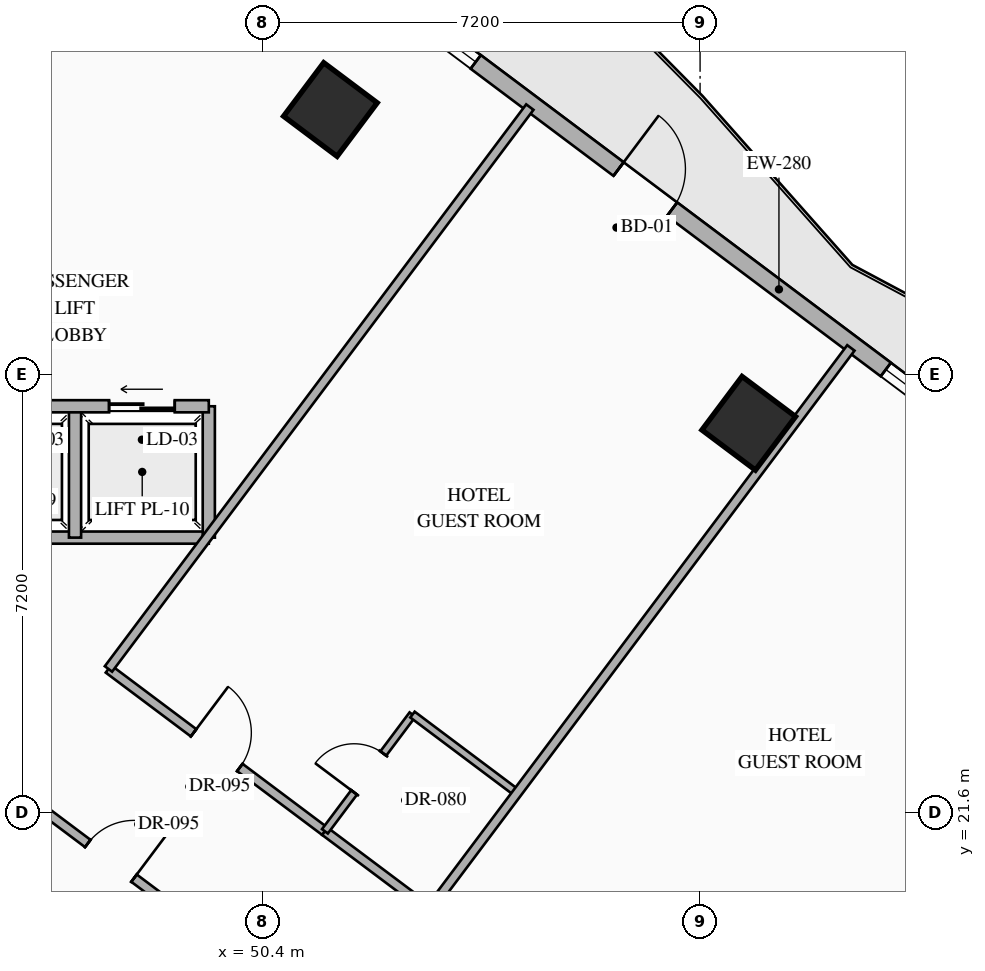
"""IFC4 building model, lengths in metres.
Left out: names, types, materials, properties, quantities, classifications, styles, units other than length and angle.
Written with IfcOpenShell. Run it as: python <this file> out.ifc"""

import sys

from ifc_helpers import new_model, si_unit, direction, frame, frame_2d, origin, origin_2d, place, context, subcontext, project, spatial, rectangle, hollow_rectangle, extrude, element, fill, save


model = new_model("IFC4")
c1 = context("Model", 3, precision=1e-05, world=origin(), true_north=direction((0.0, 1.0)))
c2 = subcontext(c1, "Body", "Model", "MODEL_VIEW")
j1 = project(units=[si_unit("LENGTHUNIT", "METRE"), si_unit("PLANEANGLEUNIT", "RADIAN")], contexts=[c1])
p1 = place(None, origin())
s1 = spatial("IfcSite", under=j1, at=p1, CompositionType="ELEMENT")
p2 = place(p1, origin())
s2 = spatial("IfcBuilding", under=s1, at=p2, CompositionType="ELEMENT")
p3 = place(p2, frame((0.0, 0.0, 66.75)))
s3 = spatial("IfcBuildingStorey", under=s2, at=p3, CompositionType="ELEMENT", Elevation=66.75)
for number, where, z_axis, x_axis in (
    (1, (51.52, 33.16, 0.0), (0.0, 0.0, 1.0), (0.8, -0.6, 0.0)),
    (2, (58.4, 28.0, 0.0), (0.0, 0.0, 1.0), (0.8, -0.6, 0.0)),
):
    element("IfcColumn", number, at=place(p3, frame(where, z_axis=z_axis, x_axis=x_axis)), inside=s3, PredefinedType="COLUMN", context=c2, shape_type="SweptSolid", body=[
        extrude(hollow_rectangle(XDim=1.1, YDim=1.1, WallThickness=0.04, at=origin_2d()), origin(), (0.0, 0.0, 1.0), 3.35),
    ])
p4 = place(p3, frame((44.86, 40.73, 0.0), z_axis=(0.0, 0.0, 1.0), x_axis=(0.800006902154, -0.599990797017, 0.0)))
e3 = element("IfcWall", 3, at=p4, inside=s3, PredefinedType="STANDARD", context=c2, shape_type="SweptSolid", body=[
    extrude(rectangle(XDim=29.712, YDim=0.28, at=frame_2d((14.856, 0.0))), origin(), (0.0, 0.0, 1.0), 3.09),
])
p5 = place(p4, frame((14.249, 0.0, 0.0)))
e4 = element("IfcOpeningElement", 4, at=p5, cuts=e3, PredefinedType="OPENING", context=c2, shape_type="SweptSolid", body=[
    extrude(rectangle(XDim=1.1, YDim=2.2, at=frame_2d((0.55, 1.1))), frame((0.0, 0.15, 0.0), z_axis=(0.0, -1.0, 0.0), x_axis=(1.0, 0.0, 0.0)), (0.0, 0.0, 1.0), 0.3),
])
p6 = place(p4, frame((1.612, 0.0, 0.85)))
e5 = element("IfcOpeningElement", 5, at=p6, cuts=e3, PredefinedType="OPENING", context=c2, shape_type="SweptSolid", body=[
    extrude(rectangle(XDim=1.4, YDim=1.8, at=frame_2d((0.7, 0.9))), frame((0.0, 0.15, 0.0), z_axis=(0.0, -1.0, 0.0), x_axis=(1.0, 0.0, 0.0)), (0.0, 0.0, 1.0), 0.3),
])
p7 = place(p4, frame((5.667, 0.0, 0.85)))
e6 = element("IfcOpeningElement", 6, at=p7, cuts=e3, PredefinedType="OPENING", context=c2, shape_type="SweptSolid", body=[
    extrude(rectangle(XDim=1.4, YDim=1.8, at=frame_2d((0.7, 0.9))), frame((0.0, 0.15, 0.0), z_axis=(0.0, -1.0, 0.0), x_axis=(1.0, 0.0, 0.0)), (0.0, 0.0, 1.0), 0.3),
])
p8 = place(p4, frame((9.912, 0.0, 0.85)))
e7 = element("IfcOpeningElement", 7, at=p8, cuts=e3, PredefinedType="OPENING", context=c2, shape_type="SweptSolid", body=[
    extrude(rectangle(XDim=1.4, YDim=1.8, at=frame_2d((0.7, 0.9))), frame((0.0, 0.15, 0.0), z_axis=(0.0, -1.0, 0.0), x_axis=(1.0, 0.0, 0.0)), (0.0, 0.0, 1.0), 0.3),
])
p9 = place(p4, frame((19.743, 0.0, 0.85)))
e8 = element("IfcOpeningElement", 8, at=p9, cuts=e3, PredefinedType="OPENING", context=c2, shape_type="SweptSolid", body=[
    extrude(rectangle(XDim=1.4, YDim=1.8, at=frame_2d((0.7, 0.9))), frame((0.0, 0.15, 0.0), z_axis=(0.0, -1.0, 0.0), x_axis=(1.0, 0.0, 0.0)), (0.0, 0.0, 1.0), 0.3),
])
p10 = place(p4, frame((22.645, 0.0, 0.85)))
e9 = element("IfcOpeningElement", 9, at=p10, cuts=e3, PredefinedType="OPENING", context=c2, shape_type="SweptSolid", body=[
    extrude(rectangle(XDim=1.4, YDim=1.8, at=frame_2d((0.7, 0.9))), frame((0.0, 0.15, 0.0), z_axis=(0.0, -1.0, 0.0), x_axis=(1.0, 0.0, 0.0)), (0.0, 0.0, 1.0), 0.3),
])
p11 = place(p4, frame((26.7, 0.0, 0.85)))
e10 = element("IfcOpeningElement", 10, at=p11, cuts=e3, PredefinedType="OPENING", context=c2, shape_type="SweptSolid", body=[
    extrude(rectangle(XDim=1.4, YDim=1.8, at=frame_2d((0.7, 0.9))), frame((0.0, 0.15, 0.0), z_axis=(0.0, -1.0, 0.0), x_axis=(1.0, 0.0, 0.0)), (0.0, 0.0, 1.0), 0.3),
])
p12 = place(p3, frame((45.12, 26.12, 0.0), z_axis=(0.0, 0.0, 1.0), x_axis=(1.0, 0.0, 0.0)))
e11 = element("IfcWall", 11, at=p12, inside=s3, PredefinedType="STANDARD", context=c2, shape_type="SweptSolid", body=[
    extrude(rectangle(XDim=4.4, YDim=0.2, at=frame_2d((2.2, 0.0))), origin(), (0.0, 0.0, 1.0), 3.09),
])
for number, where, z_axis, x_axis in (
    (12, (49.52, 26.12, 0.0), (0.0, 0.0, 1.0), (0.0, 1.0, 0.0)),
    (13, (47.32, 26.12, 0.0), (0.0, 0.0, 1.0), (0.0, 1.0, 0.0)),
):
    element("IfcWall", number, at=place(p3, frame(where, z_axis=z_axis, x_axis=x_axis)), inside=s3, PredefinedType="STANDARD", context=c2, shape_type="SweptSolid", body=[
        extrude(rectangle(XDim=2.16, YDim=0.2, at=frame_2d((1.08, 0.0))), origin(), (0.0, 0.0, 1.0), 3.09),
    ])
p13 = place(p3, frame((45.12, 28.28, 0.0), z_axis=(0.0, 0.0, 1.0), x_axis=(1.0, 0.0, 0.0)))
e14 = element("IfcWall", 14, at=p13, inside=s3, PredefinedType="STANDARD", context=c2, shape_type="SweptSolid", body=[
    extrude(rectangle(XDim=4.4, YDim=0.2, at=frame_2d((2.2, 0.0))), origin(), (0.0, 0.0, 1.0), 3.09),
])
p14 = place(p13, frame((0.56, 0.0, 0.0)))
e15 = element("IfcOpeningElement", 15, at=p14, cuts=e14, PredefinedType="OPENING", context=c2, shape_type="SweptSolid", body=[
    extrude(rectangle(XDim=1.08, YDim=2.15, at=frame_2d((0.54, 1.075))), frame((0.0, 0.11, 0.0), z_axis=(0.0, -1.0, 0.0), x_axis=(1.0, 0.0, 0.0)), (0.0, 0.0, 1.0), 0.22),
])
p15 = place(p13, frame((2.76, 0.0, 0.0)))
e16 = element("IfcOpeningElement", 16, at=p15, cuts=e14, PredefinedType="OPENING", context=c2, shape_type="SweptSolid", body=[
    extrude(rectangle(XDim=1.08, YDim=2.15, at=frame_2d((0.54, 1.075))), frame((0.0, 0.11, 0.0), z_axis=(0.0, -1.0, 0.0), x_axis=(1.0, 0.0, 0.0)), (0.0, 0.0, 1.0), 0.22),
])
p16 = place(p3, frame((47.87, 23.96, 0.0), z_axis=(0.0, 0.0, 1.0), x_axis=(0.799993416095, -0.600008778439, 0.0)))
e17 = element("IfcWall", 17, at=p16, inside=s3, PredefinedType="PARTITIONING", context=c2, shape_type="SweptSolid", body=[
    extrude(rectangle(XDim=4.45, YDim=0.15, at=frame_2d((2.225, 0.0))), origin(), (0.0, 0.0, 1.0), 2.775),
])
p17 = place(p16, frame((1.75, 0.0, 0.0)))
e18 = element("IfcOpeningElement", 18, at=p17, cuts=e17, PredefinedType="OPENING", context=c2, shape_type="SweptSolid", body=[
    extrude(rectangle(XDim=0.95, YDim=2.15, at=frame_2d((0.475, 1.075))), frame((0.0, 0.085, 0.0), z_axis=(0.0, -1.0, 0.0), x_axis=(1.0, 0.0, 0.0)), (0.0, 0.0, 1.0), 0.17),
])
p18 = place(p3, frame((51.43, 21.29, 0.0), z_axis=(0.0, 0.0, 1.0), x_axis=(0.79998637334, -0.60001816845, 0.0)))
e19 = element("IfcWall", 19, at=p18, inside=s3, PredefinedType="PARTITIONING", context=c2, shape_type="SweptSolid", body=[
    extrude(rectangle(XDim=2.15, YDim=0.15, at=frame_2d((1.075, 0.0))), origin(), (0.0, 0.0, 1.0), 2.775),
])
p19 = place(p3, frame((51.43, 21.29, 0.0), z_axis=(0.0, 0.0, 1.0), x_axis=(0.600065100855, 0.79995117022, 0.0)))
e20 = element("IfcWall", 20, at=p19, inside=s3, PredefinedType="PARTITIONING", context=c2, shape_type="SweptSolid", body=[
    extrude(rectangle(XDim=2.4, YDim=0.12, at=frame_2d((1.2, 0.0))), origin(), (0.0, 0.0, 1.0), 3.09),
])
p20 = place(p19, frame((0.8, 0.0, 0.0)))
e21 = element("IfcOpeningElement", 21, at=p20, cuts=e20, PredefinedType="OPENING", context=c2, shape_type="SweptSolid", body=[
    extrude(rectangle(XDim=0.8, YDim=2.06, at=frame_2d((0.4, 1.03))), frame((0.0, 0.07, 0.0), z_axis=(0.0, -1.0, 0.0), x_axis=(1.0, 0.0, 0.0)), (0.0, 0.0, 1.0), 0.14),
])
p21 = place(p3, frame((52.87, 23.21, 0.0), z_axis=(0.0, 0.0, 1.0), x_axis=(0.79998637334, -0.60001816845, 0.0)))
e22 = element("IfcWall", 22, at=p21, inside=s3, PredefinedType="PARTITIONING", context=c2, shape_type="SweptSolid", body=[
    extrude(rectangle(XDim=2.15, YDim=0.12, at=frame_2d((1.075, 0.0))), origin(), (0.0, 0.0, 1.0), 3.09),
])
for number, where, z_axis, x_axis in (
    (23, (47.87, 23.96, 0.0), (0.0, 0.0, 1.0), (0.6, 0.8, 0.0)),
    (24, (53.15, 20.0, 0.0), (0.0, 0.0, 1.0), (0.6, 0.8, 0.0)),
    (25, (58.43, 16.04, 0.0), (0.0, 0.0, 1.0), (0.6, 0.8, 0.0)),
):
    element("IfcWall", number, at=place(p3, frame(where, z_axis=z_axis, x_axis=x_axis)), inside=s3, PredefinedType="PARTITIONING", context=c2, shape_type="SweptSolid", body=[
        extrude(rectangle(XDim=11.55, YDim=0.15, at=frame_2d((5.775, 0.0))), origin(), (0.0, 0.0, 1.0), 3.09),
    ])
p22 = place(p3, frame((46.37, 21.96, 0.0), z_axis=(0.0, 0.0, 1.0), x_axis=(0.799977170108, -0.600030438649, 0.0)))
e26 = element("IfcWall", 26, at=p22, inside=s3, PredefinedType="PARTITIONING", context=c2, shape_type="SweptSolid", body=[
    extrude(rectangle(XDim=3.85, YDim=0.15, at=frame_2d((1.925, 0.0))), origin(), (0.0, 0.0, 1.0), 2.425),
])
p23 = place(p22, frame((1.45, 0.0, 0.0)))
e27 = element("IfcOpeningElement", 27, at=p23, cuts=e26, PredefinedType="OPENING", context=c2, shape_type="SweptSolid", body=[
    extrude(rectangle(XDim=0.95, YDim=2.15, at=frame_2d((0.475, 1.075))), frame((0.0, 0.085, 0.0), z_axis=(0.0, -1.0, 0.0), x_axis=(1.0, 0.0, 0.0)), (0.0, 0.0, 1.0), 0.17),
])
p24 = place(p5, origin())
e28 = element("IfcDoor", 28, at=p24, inside=s3, OperationType="SINGLE_SWING_LEFT", PredefinedType="DOOR", context=c2, shape_type="SweptSolid", body=[
    extrude(rectangle(XDim=1.1, YDim=2.2, at=frame_2d((0.55, 1.1))), frame((0.0, 0.025, 0.0), z_axis=(0.0, -1.0, 0.0), x_axis=(1.0, 0.0, 0.0)), (0.0, 0.0, 1.0), 0.05),
])
fill(e4, e28)
p25 = place(p8, origin())
e29 = element("IfcWindow", 29, at=p25, inside=s3, PartitioningType="SINGLE_PANEL", PredefinedType="WINDOW", context=c2, shape_type="SweptSolid", body=[
    extrude(rectangle(XDim=1.4, YDim=1.8, at=frame_2d((0.7, 0.9))), frame((0.0, 0.03, 0.0), z_axis=(0.0, -1.0, 0.0), x_axis=(1.0, 0.0, 0.0)), (0.0, 0.0, 1.0), 0.06),
])
fill(e7, e29)
p26 = place(p9, origin())
e30 = element("IfcWindow", 30, at=p26, inside=s3, PartitioningType="SINGLE_PANEL", PredefinedType="WINDOW", context=c2, shape_type="SweptSolid", body=[
    extrude(rectangle(XDim=1.4, YDim=1.8, at=frame_2d((0.7, 0.9))), frame((0.0, 0.03, 0.0), z_axis=(0.0, -1.0, 0.0), x_axis=(1.0, 0.0, 0.0)), (0.0, 0.0, 1.0), 0.06),
])
fill(e8, e30)
p27 = place(p15, origin())
e31 = element("IfcDoor", 31, at=p27, inside=s3, OperationType="SLIDING_TO_LEFT", PredefinedType="USERDEFINED", context=c2, shape_type="SweptSolid", body=[
    extrude(rectangle(XDim=1.08, YDim=2.15, at=frame_2d((0.54, 1.075))), frame((0.0, 0.025, 0.0), z_axis=(0.0, -1.0, 0.0), x_axis=(1.0, 0.0, 0.0)), (0.0, 0.0, 1.0), 0.05),
])
fill(e16, e31)
p28 = place(p17, origin())
e32 = element("IfcDoor", 32, at=p28, inside=s3, OperationType="SINGLE_SWING_LEFT", PredefinedType="DOOR", context=c2, shape_type="SweptSolid", body=[
    extrude(rectangle(XDim=0.95, YDim=2.15, at=frame_2d((0.475, 1.075))), frame((0.0, 0.025, 0.0), z_axis=(0.0, -1.0, 0.0), x_axis=(1.0, 0.0, 0.0)), (0.0, 0.0, 1.0), 0.05),
])
fill(e18, e32)
p29 = place(p20, origin())
e33 = element("IfcDoor", 33, at=p29, inside=s3, OperationType="SINGLE_SWING_LEFT", PredefinedType="DOOR", context=c2, shape_type="SweptSolid", body=[
    extrude(rectangle(XDim=0.8, YDim=2.06, at=frame_2d((0.4, 1.03))), frame((0.0, 0.025, 0.0), z_axis=(0.0, -1.0, 0.0), x_axis=(1.0, 0.0, 0.0)), (0.0, 0.0, 1.0), 0.05),
])
fill(e21, e33)
p30 = place(p23, origin())
e34 = element("IfcDoor", 34, at=p30, inside=s3, OperationType="SINGLE_SWING_RIGHT", PredefinedType="DOOR", context=c2, shape_type="SweptSolid", body=[
    extrude(rectangle(XDim=0.95, YDim=2.15, at=frame_2d((0.475, 1.075))), frame((0.0, 0.025, 0.0), z_axis=(0.0, -1.0, 0.0), x_axis=(1.0, 0.0, 0.0)), (0.0, 0.0, 1.0), 0.05),
])
fill(e27, e34)
save(model, sys.argv[1])
